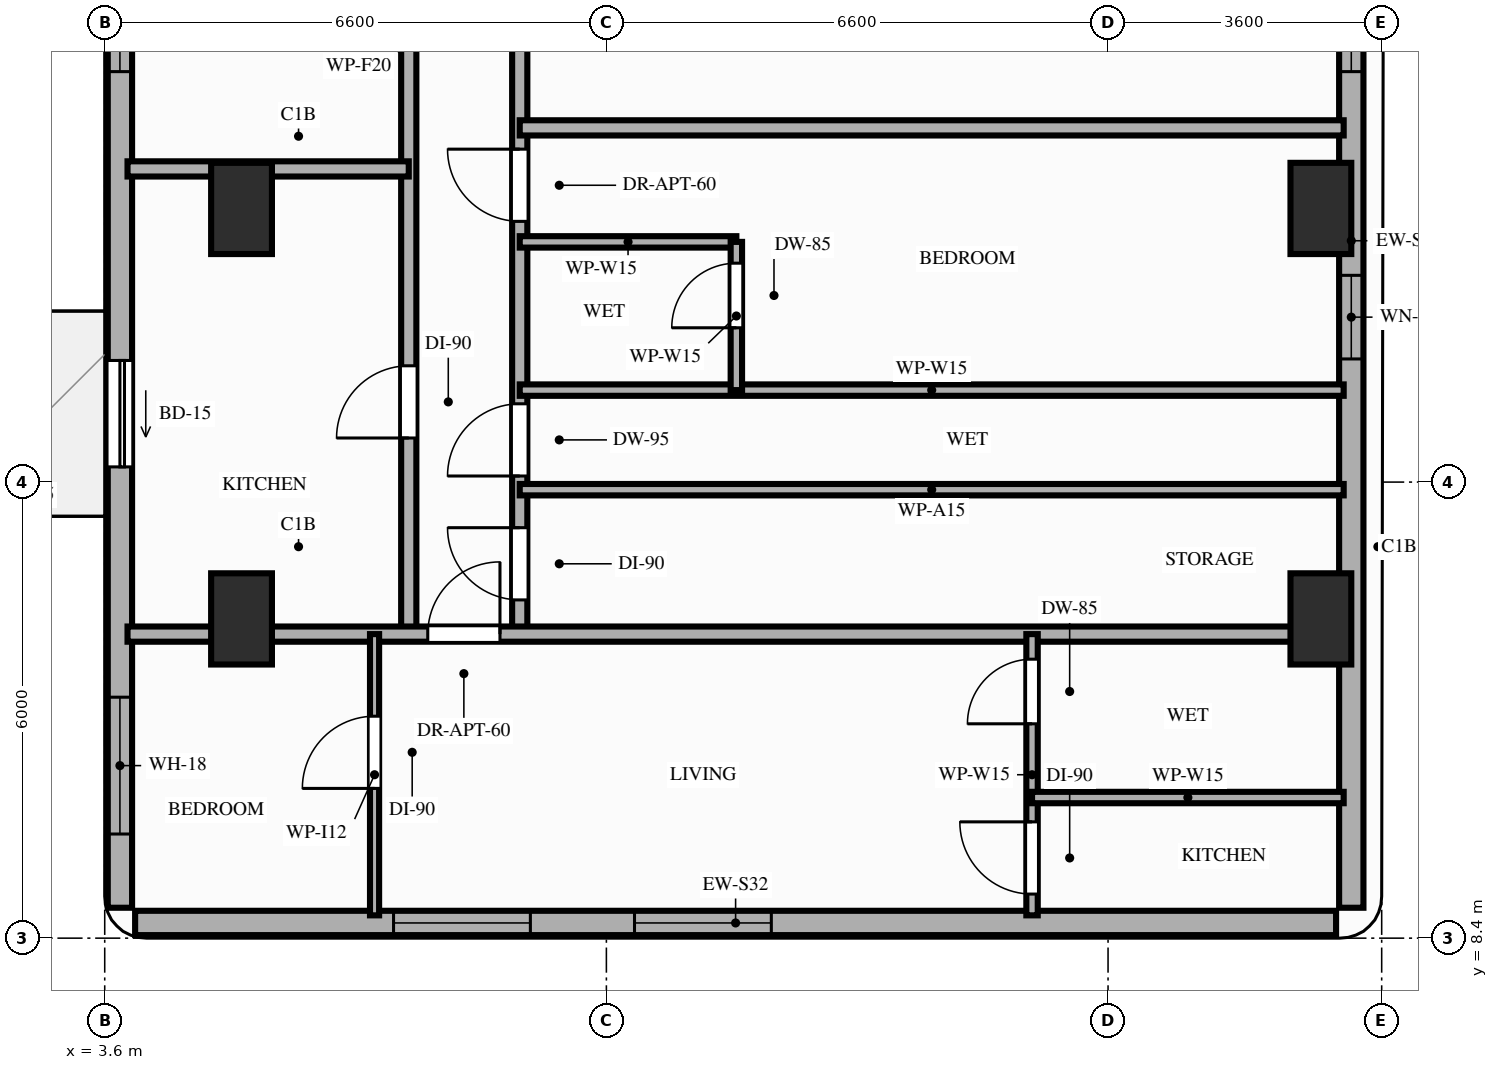
"""IFC4 building model, lengths in metres.
Left out: names, types, materials, properties, quantities, classifications, styles, units other than length and angle.
Written with IfcOpenShell. Run it as: python <this file> out.ifc"""

import sys

from ifc_helpers import new_model, si_unit, direction, frame, frame_2d, origin, origin_2d, place, context, subcontext, project, spatial, rectangle, extrude, element, fill, save


model = new_model("IFC4")
c1 = context("Model", 3, precision=1e-05, world=origin(), true_north=direction((0.0, 1.0)))
c2 = subcontext(c1, "Body", "Model", "MODEL_VIEW")
j1 = project(units=[si_unit("LENGTHUNIT", "METRE"), si_unit("PLANEANGLEUNIT", "RADIAN")], contexts=[c1])
p1 = place(None, origin())
s1 = spatial("IfcSite", under=j1, at=p1, CompositionType="ELEMENT")
p2 = place(p1, origin())
s2 = spatial("IfcBuilding", under=s1, at=p2, CompositionType="ELEMENT")
p3 = place(p2, frame((0.0, 0.0, 99.4)))
s3 = spatial("IfcBuildingStorey", under=s2, at=p3, CompositionType="ELEMENT", Elevation=99.4)
for number, where, z_axis, x_axis in (
    (1, (5.4, 12.6, 0.0), (0.0, 0.0, 1.0), (1.0, 0.0, 0.0)),
    (2, (19.6, 12.6, 0.0), (0.0, 0.0, 1.0), (1.0, 0.0, 0.0)),
    (3, (5.4, 18.0, 0.0), (0.0, 0.0, 1.0), (1.0, 0.0, 0.0)),
    (4, (19.6, 18.0, 0.0), (0.0, 0.0, 1.0), (1.0, 0.0, 0.0)),
):
    element("IfcColumn", number, at=place(p3, frame(where, z_axis=z_axis, x_axis=x_axis)), inside=s3, PredefinedType="COLUMN", context=c2, shape_type="SweptSolid", body=[
        extrude(rectangle(XDim=0.8, YDim=1.2, at=origin_2d()), origin(), (0.0, 0.0, 1.0), 3.2),
    ])
p4 = place(p3, frame((4.0, 8.6, 0.0), z_axis=(0.0, 0.0, 1.0), x_axis=(1.0, 0.0, 0.0)))
e5 = element("IfcWall", 5, at=p4, inside=s3, PredefinedType="STANDARD", context=c2, shape_type="SweptSolid", body=[
    extrude(rectangle(XDim=15.8, YDim=0.32, at=frame_2d((7.9, 0.0))), origin(), (0.0, 0.0, 1.0), 2.96),
])
p5 = place(p4, frame((6.57, 0.0, 0.85)))
e6 = element("IfcOpeningElement", 6, at=p5, cuts=e5, PredefinedType="OPENING", context=c2, shape_type="SweptSolid", body=[
    extrude(rectangle(XDim=1.8, YDim=1.75, at=frame_2d((0.9, 0.875))), frame((0.0, 0.17, 0.0), z_axis=(0.0, -1.0, 0.0), x_axis=(1.0, 0.0, 0.0)), (0.0, 0.0, 1.0), 0.34),
])
p6 = place(p4, frame((3.4, 0.0, 0.85)))
e7 = element("IfcOpeningElement", 7, at=p6, cuts=e5, PredefinedType="OPENING", context=c2, shape_type="SweptSolid", body=[
    extrude(rectangle(XDim=1.8, YDim=1.75, at=frame_2d((0.9, 0.875))), frame((0.0, 0.17, 0.0), z_axis=(0.0, -1.0, 0.0), x_axis=(1.0, 0.0, 0.0)), (0.0, 0.0, 1.0), 0.34),
])
p7 = place(p3, frame((3.8, 42.1, 0.0), z_axis=(0.0, 0.0, 1.0), x_axis=(0.0, -1.0, 0.0)))
e8 = element("IfcWall", 8, at=p7, inside=s3, PredefinedType="STANDARD", context=c2, shape_type="SweptSolid", body=[
    extrude(rectangle(XDim=33.3, YDim=0.32, at=frame_2d((16.65, 0.0))), origin(), (0.0, 0.0, 1.0), 2.96),
])
p8 = place(p7, frame((26.1, 0.0, 0.0)))
e9 = element("IfcOpeningElement", 9, at=p8, cuts=e8, PredefinedType="OPENING", context=c2, shape_type="SweptSolid", body=[
    extrude(rectangle(XDim=1.4, YDim=2.1, at=frame_2d((0.7, 1.05))), frame((0.0, 0.17, 0.0), z_axis=(0.0, -1.0, 0.0), x_axis=(1.0, 0.0, 0.0)), (0.0, 0.0, 1.0), 0.34),
])
p9 = place(p7, frame((15.3, 0.0, 0.0)))
e10 = element("IfcOpeningElement", 10, at=p9, cuts=e8, PredefinedType="OPENING", context=c2, shape_type="SweptSolid", body=[
    extrude(rectangle(XDim=1.4, YDim=2.1, at=frame_2d((0.7, 1.05))), frame((0.0, 0.17, 0.0), z_axis=(0.0, -1.0, 0.0), x_axis=(1.0, 0.0, 0.0)), (0.0, 0.0, 1.0), 0.34),
])
p10 = place(p7, frame((30.53, 0.0, 0.85)))
e11 = element("IfcOpeningElement", 11, at=p10, cuts=e8, PredefinedType="OPENING", context=c2, shape_type="SweptSolid", body=[
    extrude(rectangle(XDim=1.8, YDim=1.75, at=frame_2d((0.9, 0.875))), frame((0.0, 0.17, 0.0), z_axis=(0.0, -1.0, 0.0), x_axis=(1.0, 0.0, 0.0)), (0.0, 0.0, 1.0), 0.34),
])
p11 = place(p7, frame((20.5, 0.0, 0.85)))
e12 = element("IfcOpeningElement", 12, at=p11, cuts=e8, PredefinedType="OPENING", context=c2, shape_type="SweptSolid", body=[
    extrude(rectangle(XDim=1.8, YDim=1.75, at=frame_2d((0.9, 0.875))), frame((0.0, 0.17, 0.0), z_axis=(0.0, -1.0, 0.0), x_axis=(1.0, 0.0, 0.0)), (0.0, 0.0, 1.0), 0.34),
])
p12 = place(p7, frame((9.9, 0.0, 0.85)))
e13 = element("IfcOpeningElement", 13, at=p12, cuts=e8, PredefinedType="OPENING", context=c2, shape_type="SweptSolid", body=[
    extrude(rectangle(XDim=1.8, YDim=1.75, at=frame_2d((0.9, 0.875))), frame((0.0, 0.17, 0.0), z_axis=(0.0, -1.0, 0.0), x_axis=(1.0, 0.0, 0.0)), (0.0, 0.0, 1.0), 0.34),
])
p13 = place(p7, frame((3.8, 0.0, 0.85)))
e14 = element("IfcOpeningElement", 14, at=p13, cuts=e8, PredefinedType="OPENING", context=c2, shape_type="SweptSolid", body=[
    extrude(rectangle(XDim=1.8, YDim=1.75, at=frame_2d((0.9, 0.875))), frame((0.0, 0.17, 0.0), z_axis=(0.0, -1.0, 0.0), x_axis=(1.0, 0.0, 0.0)), (0.0, 0.0, 1.0), 0.34),
])
p14 = place(p3, frame((20.0, 8.8, 0.0), z_axis=(0.0, 0.0, 1.0), x_axis=(0.0, 1.0, 0.0)))
e15 = element("IfcWall", 15, at=p14, inside=s3, PredefinedType="STANDARD", context=c2, shape_type="SweptSolid", body=[
    extrude(rectangle(XDim=17.55, YDim=0.32, at=frame_2d((8.775, 0.0))), origin(), (0.0, 0.0, 1.0), 2.35),
])
p15 = place(p14, frame((7.22, 0.0, 0.85)))
e16 = element("IfcOpeningElement", 16, at=p15, cuts=e15, PredefinedType="OPENING", context=c2, shape_type="SweptSolid", body=[
    extrude(rectangle(XDim=1.1, YDim=1.25, at=frame_2d((0.55, 0.625))), frame((0.0, 0.17, 0.0), z_axis=(0.0, -1.0, 0.0), x_axis=(1.0, 0.0, 0.0)), (0.0, 0.0, 1.0), 0.34),
])
p16 = place(p14, frame((11.0, 0.0, 0.85)))
e17 = element("IfcOpeningElement", 17, at=p16, cuts=e15, PredefinedType="OPENING", context=c2, shape_type="SweptSolid", body=[
    extrude(rectangle(XDim=1.8, YDim=1.25, at=frame_2d((0.9, 0.625))), frame((0.0, 0.17, 0.0), z_axis=(0.0, -1.0, 0.0), x_axis=(1.0, 0.0, 0.0)), (0.0, 0.0, 1.0), 0.34),
])
p17 = place(p3, frame((7.6, 12.4, 0.0), z_axis=(0.0, 0.0, 1.0), x_axis=(0.0, 1.0, 0.0)))
e18 = element("IfcWall", 18, at=p17, inside=s3, PredefinedType="PARTITIONING", context=c2, shape_type="SweptSolid", body=[
    extrude(rectangle(XDim=15.7, YDim=0.2, at=frame_2d((7.85, 0.0))), origin(), (0.0, 0.0, 1.0), 2.35),
])
p18 = place(p17, frame((2.58, 0.0, 0.0)))
e19 = element("IfcOpeningElement", 19, at=p18, cuts=e18, PredefinedType="OPENING", context=c2, shape_type="SweptSolid", body=[
    extrude(rectangle(XDim=0.95, YDim=2.15, at=frame_2d((0.475, 1.075))), frame((0.0, 0.11, 0.0), z_axis=(0.0, -1.0, 0.0), x_axis=(1.0, 0.0, 0.0)), (0.0, 0.0, 1.0), 0.22),
])
p19 = place(p17, frame((7.84, 0.0, 0.0)))
e20 = element("IfcOpeningElement", 20, at=p19, cuts=e18, PredefinedType="OPENING", context=c2, shape_type="SweptSolid", body=[
    extrude(rectangle(XDim=0.95, YDim=2.15, at=frame_2d((0.475, 1.075))), frame((0.0, 0.11, 0.0), z_axis=(0.0, -1.0, 0.0), x_axis=(1.0, 0.0, 0.0)), (0.0, 0.0, 1.0), 0.22),
])
p20 = place(p17, frame((12.63, 0.0, 0.0)))
e21 = element("IfcOpeningElement", 21, at=p20, cuts=e18, PredefinedType="OPENING", context=c2, shape_type="SweptSolid", body=[
    extrude(rectangle(XDim=0.95, YDim=2.15, at=frame_2d((0.475, 1.075))), frame((0.0, 0.11, 0.0), z_axis=(0.0, -1.0, 0.0), x_axis=(1.0, 0.0, 0.0)), (0.0, 0.0, 1.0), 0.22),
])
p21 = place(p3, frame((9.06, 12.4, 0.0), z_axis=(0.0, 0.0, 1.0), x_axis=(0.0, 1.0, 0.0)))
e22 = element("IfcWall", 22, at=p21, inside=s3, PredefinedType="PARTITIONING", context=c2, shape_type="SweptSolid", body=[
    extrude(rectangle(XDim=15.7, YDim=0.2, at=frame_2d((7.85, 0.0))), origin(), (0.0, 0.0, 1.0), 2.35),
])
p22 = place(p21, frame((0.45, 0.0, 0.0)))
e23 = element("IfcOpeningElement", 23, at=p22, cuts=e22, PredefinedType="OPENING", context=c2, shape_type="SweptSolid", body=[
    extrude(rectangle(XDim=0.95, YDim=2.15, at=frame_2d((0.475, 1.075))), frame((0.0, 0.11, 0.0), z_axis=(0.0, -1.0, 0.0), x_axis=(1.0, 0.0, 0.0)), (0.0, 0.0, 1.0), 0.22),
])
p23 = place(p21, frame((2.08, 0.0, 0.0)))
e24 = element("IfcOpeningElement", 24, at=p23, cuts=e22, PredefinedType="OPENING", context=c2, shape_type="SweptSolid", body=[
    extrude(rectangle(XDim=0.95, YDim=2.1, at=frame_2d((0.475, 1.05))), frame((0.0, 0.11, 0.0), z_axis=(0.0, -1.0, 0.0), x_axis=(1.0, 0.0, 0.0)), (0.0, 0.0, 1.0), 0.22),
])
p24 = place(p21, frame((10.7, 0.0, 0.0)))
e25 = element("IfcOpeningElement", 25, at=p24, cuts=e22, PredefinedType="OPENING", context=c2, shape_type="SweptSolid", body=[
    extrude(rectangle(XDim=0.95, YDim=2.15, at=frame_2d((0.475, 1.075))), frame((0.0, 0.11, 0.0), z_axis=(0.0, -1.0, 0.0), x_axis=(1.0, 0.0, 0.0)), (0.0, 0.0, 1.0), 0.22),
])
p25 = place(p21, frame((5.43, 0.0, 0.0)))
e26 = element("IfcOpeningElement", 26, at=p25, cuts=e22, PredefinedType="OPENING", context=c2, shape_type="SweptSolid", body=[
    extrude(rectangle(XDim=0.95, YDim=2.15, at=frame_2d((0.475, 1.075))), frame((0.0, 0.11, 0.0), z_axis=(0.0, -1.0, 0.0), x_axis=(1.0, 0.0, 0.0)), (0.0, 0.0, 1.0), 0.22),
])
p26 = place(p3, frame((3.9, 12.4, 0.0), z_axis=(0.0, 0.0, 1.0), x_axis=(1.0, 0.0, 0.0)))
e27 = element("IfcWall", 27, at=p26, inside=s3, PredefinedType="PARTITIONING", context=c2, shape_type="SweptSolid", body=[
    extrude(rectangle(XDim=16.0, YDim=0.2, at=frame_2d((8.0, 0.0))), origin(), (0.0, 0.0, 1.0), 2.35),
])
p27 = place(p26, frame((3.95, 0.0, 0.0)))
e28 = element("IfcOpeningElement", 28, at=p27, cuts=e27, PredefinedType="OPENING", context=c2, shape_type="SweptSolid", body=[
    extrude(rectangle(XDim=0.95, YDim=2.15, at=frame_2d((0.475, 1.075))), frame((0.0, 0.11, 0.0), z_axis=(0.0, -1.0, 0.0), x_axis=(1.0, 0.0, 0.0)), (0.0, 0.0, 1.0), 0.22),
])
p28 = place(p3, frame((3.9, 18.52, 0.0), z_axis=(0.0, 0.0, 1.0), x_axis=(1.0, 0.0, 0.0)))
e29 = element("IfcWall", 29, at=p28, inside=s3, PredefinedType="PARTITIONING", context=c2, shape_type="SweptSolid", body=[
    extrude(rectangle(XDim=3.7, YDim=0.2, at=frame_2d((1.85, 0.0))), origin(), (0.0, 0.0, 1.0), 2.35),
])
p29 = place(p3, frame((7.15, 8.7, 0.0), z_axis=(0.0, 0.0, 1.0), x_axis=(0.0, 1.0, 0.0)))
e30 = element("IfcWall", 30, at=p29, inside=s3, PredefinedType="PARTITIONING", context=c2, shape_type="SweptSolid", body=[
    extrude(rectangle(XDim=3.7, YDim=0.12, at=frame_2d((1.85, 0.0))), origin(), (0.0, 0.0, 1.0), 2.35),
])
p30 = place(p29, frame((1.67, 0.0, 0.0)))
e31 = element("IfcOpeningElement", 31, at=p30, cuts=e30, PredefinedType="OPENING", context=c2, shape_type="SweptSolid", body=[
    extrude(rectangle(XDim=0.95, YDim=2.15, at=frame_2d((0.475, 1.075))), frame((0.0, 0.07, 0.0), z_axis=(0.0, -1.0, 0.0), x_axis=(1.0, 0.0, 0.0)), (0.0, 0.0, 1.0), 0.14),
])
p31 = place(p3, frame((15.8, 8.7, 0.0), z_axis=(0.0, 0.0, 1.0), x_axis=(0.0, 1.0, 0.0)))
e32 = element("IfcWall", 32, at=p31, inside=s3, PredefinedType="PARTITIONING", context=c2, shape_type="SweptSolid", body=[
    extrude(rectangle(XDim=3.7, YDim=0.15, at=frame_2d((1.85, 0.0))), origin(), (0.0, 0.0, 1.0), 2.35),
])
p32 = place(p31, frame((0.28, 0.0, 0.0)))
e33 = element("IfcOpeningElement", 33, at=p32, cuts=e32, PredefinedType="OPENING", context=c2, shape_type="SweptSolid", body=[
    extrude(rectangle(XDim=0.95, YDim=2.15, at=frame_2d((0.475, 1.075))), frame((0.0, 0.085, 0.0), z_axis=(0.0, -1.0, 0.0), x_axis=(1.0, 0.0, 0.0)), (0.0, 0.0, 1.0), 0.17),
])
p33 = place(p31, frame((2.52, 0.0, 0.0)))
e34 = element("IfcOpeningElement", 34, at=p33, cuts=e32, PredefinedType="OPENING", context=c2, shape_type="SweptSolid", body=[
    extrude(rectangle(XDim=0.85, YDim=2.1, at=frame_2d((0.425, 1.05))), frame((0.0, 0.085, 0.0), z_axis=(0.0, -1.0, 0.0), x_axis=(1.0, 0.0, 0.0)), (0.0, 0.0, 1.0), 0.17),
])
p34 = place(p3, frame((15.8, 10.25, 0.0), z_axis=(0.0, 0.0, 1.0), x_axis=(1.0, 0.0, 0.0)))
e35 = element("IfcWall", 35, at=p34, inside=s3, PredefinedType="PARTITIONING", context=c2, shape_type="SweptSolid", body=[
    extrude(rectangle(XDim=4.1, YDim=0.15, at=frame_2d((2.05, 0.0))), origin(), (0.0, 0.0, 1.0), 2.96),
])
for number, where, z_axis, x_axis in (
    (36, (9.06, 14.3, 0.0), (0.0, 0.0, 1.0), (1.0, 0.0, 0.0)),
    (37, (9.06, 15.61, 0.0), (0.0, 0.0, 1.0), (1.0, 0.0, 0.0)),
):
    element("IfcWall", number, at=place(p3, frame(where, z_axis=z_axis, x_axis=x_axis)), inside=s3, PredefinedType="PARTITIONING", context=c2, shape_type="SweptSolid", body=[
        extrude(rectangle(XDim=10.84, YDim=0.15, at=frame_2d((5.42, 0.0))), origin(), (0.0, 0.0, 1.0), 2.35),
    ])
p35 = place(p3, frame((9.06, 19.06, 0.0), z_axis=(0.0, 0.0, 1.0), x_axis=(1.0, 0.0, 0.0)))
e38 = element("IfcWall", 38, at=p35, inside=s3, PredefinedType="PARTITIONING", context=c2, shape_type="SweptSolid", body=[
    extrude(rectangle(XDim=10.84, YDim=0.2, at=frame_2d((5.42, 0.0))), origin(), (0.0, 0.0, 1.0), 2.35),
])
p36 = place(p3, frame((9.06, 17.56, 0.0), z_axis=(0.0, 0.0, 1.0), x_axis=(1.0, 0.0, 0.0)))
e39 = element("IfcWall", 39, at=p36, inside=s3, PredefinedType="PARTITIONING", context=c2, shape_type="SweptSolid", body=[
    extrude(rectangle(XDim=2.85, YDim=0.15, at=frame_2d((1.425, 0.0))), origin(), (0.0, 0.0, 1.0), 2.96),
])
p37 = place(p3, frame((11.91, 15.61, 0.0), z_axis=(0.0, 0.0, 1.0), x_axis=(0.0, 1.0, 0.0)))
e40 = element("IfcWall", 40, at=p37, inside=s3, PredefinedType="PARTITIONING", context=c2, shape_type="SweptSolid", body=[
    extrude(rectangle(XDim=1.95, YDim=0.15, at=frame_2d((0.975, 0.0))), origin(), (0.0, 0.0, 1.0), 2.54),
])
p38 = place(p37, frame((0.82, 0.0, 0.0)))
e41 = element("IfcOpeningElement", 41, at=p38, cuts=e40, PredefinedType="OPENING", context=c2, shape_type="SweptSolid", body=[
    extrude(rectangle(XDim=0.85, YDim=2.1, at=frame_2d((0.425, 1.05))), frame((0.0, 0.085, 0.0), z_axis=(0.0, -1.0, 0.0), x_axis=(1.0, 0.0, 0.0)), (0.0, 0.0, 1.0), 0.17),
])
p39 = place(p8, origin())
e42 = element("IfcDoor", 42, at=p39, inside=s3, OperationType="SLIDING_TO_RIGHT", PredefinedType="DOOR", context=c2, shape_type="SweptSolid", body=[
    extrude(rectangle(XDim=1.4, YDim=2.1, at=frame_2d((0.7, 1.05))), frame((0.0, 0.025, 0.0), z_axis=(0.0, -1.0, 0.0), x_axis=(1.0, 0.0, 0.0)), (0.0, 0.0, 1.0), 0.05),
])
fill(e9, e42)
p40 = place(p10, origin())
e43 = element("IfcWindow", 43, at=p40, inside=s3, PartitioningType="SINGLE_PANEL", PredefinedType="WINDOW", context=c2, shape_type="SweptSolid", body=[
    extrude(rectangle(XDim=1.8, YDim=1.75, at=frame_2d((0.9, 0.875))), frame((0.0, 0.03, 0.0), z_axis=(0.0, -1.0, 0.0), x_axis=(1.0, 0.0, 0.0)), (0.0, 0.0, 1.0), 0.06),
])
fill(e11, e43)
p41 = place(p5, origin())
e44 = element("IfcWindow", 44, at=p41, inside=s3, PartitioningType="SINGLE_PANEL", PredefinedType="WINDOW", context=c2, shape_type="SweptSolid", body=[
    extrude(rectangle(XDim=1.8, YDim=1.75, at=frame_2d((0.9, 0.875))), frame((0.0, 0.03, 0.0), z_axis=(0.0, -1.0, 0.0), x_axis=(1.0, 0.0, 0.0)), (0.0, 0.0, 1.0), 0.06),
])
fill(e6, e44)
p42 = place(p15, origin())
e45 = element("IfcWindow", 45, at=p42, inside=s3, PartitioningType="SINGLE_PANEL", PredefinedType="WINDOW", context=c2, shape_type="SweptSolid", body=[
    extrude(rectangle(XDim=1.1, YDim=1.25, at=frame_2d((0.55, 0.625))), frame((0.0, 0.03, 0.0), z_axis=(0.0, -1.0, 0.0), x_axis=(1.0, 0.0, 0.0)), (0.0, 0.0, 1.0), 0.06),
])
fill(e16, e45)
p43 = place(p11, origin())
e46 = element("IfcWindow", 46, at=p43, inside=s3, PartitioningType="SINGLE_PANEL", PredefinedType="WINDOW", context=c2, shape_type="SweptSolid", body=[
    extrude(rectangle(XDim=1.8, YDim=1.75, at=frame_2d((0.9, 0.875))), frame((0.0, 0.03, 0.0), z_axis=(0.0, -1.0, 0.0), x_axis=(1.0, 0.0, 0.0)), (0.0, 0.0, 1.0), 0.06),
])
fill(e12, e46)
p44 = place(p16, origin())
e47 = element("IfcWindow", 47, at=p44, inside=s3, PartitioningType="SINGLE_PANEL", PredefinedType="WINDOW", context=c2, shape_type="SweptSolid", body=[
    extrude(rectangle(XDim=1.8, YDim=1.25, at=frame_2d((0.9, 0.625))), frame((0.0, 0.03, 0.0), z_axis=(0.0, -1.0, 0.0), x_axis=(1.0, 0.0, 0.0)), (0.0, 0.0, 1.0), 0.06),
])
fill(e17, e47)
p45 = place(p6, origin())
e48 = element("IfcWindow", 48, at=p45, inside=s3, PartitioningType="SINGLE_PANEL", PredefinedType="WINDOW", context=c2, shape_type="SweptSolid", body=[
    extrude(rectangle(XDim=1.8, YDim=1.75, at=frame_2d((0.9, 0.875))), frame((0.0, 0.03, 0.0), z_axis=(0.0, -1.0, 0.0), x_axis=(1.0, 0.0, 0.0)), (0.0, 0.0, 1.0), 0.06),
])
fill(e7, e48)
p46 = place(p18, origin())
e49 = element("IfcDoor", 49, at=p46, inside=s3, OperationType="SINGLE_SWING_LEFT", PredefinedType="DOOR", context=c2, shape_type="SweptSolid", body=[
    extrude(rectangle(XDim=0.95, YDim=2.15, at=frame_2d((0.475, 1.075))), frame((0.0, 0.025, 0.0), z_axis=(0.0, -1.0, 0.0), x_axis=(1.0, 0.0, 0.0)), (0.0, 0.0, 1.0), 0.05),
])
fill(e19, e49)
p47 = place(p27, origin())
e50 = element("IfcDoor", 50, at=p47, inside=s3, OperationType="SINGLE_SWING_RIGHT", PredefinedType="DOOR", context=c2, shape_type="SweptSolid", body=[
    extrude(rectangle(XDim=0.95, YDim=2.15, at=frame_2d((0.475, 1.075))), frame((0.0, 0.025, 0.0), z_axis=(0.0, -1.0, 0.0), x_axis=(1.0, 0.0, 0.0)), (0.0, 0.0, 1.0), 0.05),
])
fill(e28, e50)
p48 = place(p30, origin())
e51 = element("IfcDoor", 51, at=p48, inside=s3, OperationType="SINGLE_SWING_LEFT", PredefinedType="DOOR", context=c2, shape_type="SweptSolid", body=[
    extrude(rectangle(XDim=0.95, YDim=2.15, at=frame_2d((0.475, 1.075))), frame((0.0, 0.025, 0.0), z_axis=(0.0, -1.0, 0.0), x_axis=(1.0, 0.0, 0.0)), (0.0, 0.0, 1.0), 0.05),
])
fill(e31, e51)
p49 = place(p32, origin())
e52 = element("IfcDoor", 52, at=p49, inside=s3, OperationType="SINGLE_SWING_RIGHT", PredefinedType="DOOR", context=c2, shape_type="SweptSolid", body=[
    extrude(rectangle(XDim=0.95, YDim=2.15, at=frame_2d((0.475, 1.075))), frame((0.0, 0.025, 0.0), z_axis=(0.0, -1.0, 0.0), x_axis=(1.0, 0.0, 0.0)), (0.0, 0.0, 1.0), 0.05),
])
fill(e33, e52)
p50 = place(p33, origin())
e53 = element("IfcDoor", 53, at=p50, inside=s3, OperationType="SINGLE_SWING_LEFT", PredefinedType="DOOR", context=c2, shape_type="SweptSolid", body=[
    extrude(rectangle(XDim=0.85, YDim=2.1, at=frame_2d((0.425, 1.05))), frame((0.0, 0.025, 0.0), z_axis=(0.0, -1.0, 0.0), x_axis=(1.0, 0.0, 0.0)), (0.0, 0.0, 1.0), 0.05),
])
fill(e34, e53)
p51 = place(p22, origin())
e54 = element("IfcDoor", 54, at=p51, inside=s3, OperationType="SINGLE_SWING_RIGHT", PredefinedType="DOOR", context=c2, shape_type="SweptSolid", body=[
    extrude(rectangle(XDim=0.95, YDim=2.15, at=frame_2d((0.475, 1.075))), frame((0.0, 0.025, 0.0), z_axis=(0.0, -1.0, 0.0), x_axis=(1.0, 0.0, 0.0)), (0.0, 0.0, 1.0), 0.05),
])
fill(e23, e54)
p52 = place(p23, origin())
e55 = element("IfcDoor", 55, at=p52, inside=s3, OperationType="SINGLE_SWING_LEFT", PredefinedType="DOOR", context=c2, shape_type="SweptSolid", body=[
    extrude(rectangle(XDim=0.95, YDim=2.1, at=frame_2d((0.475, 1.05))), frame((0.0, 0.025, 0.0), z_axis=(0.0, -1.0, 0.0), x_axis=(1.0, 0.0, 0.0)), (0.0, 0.0, 1.0), 0.05),
])
fill(e24, e55)
p53 = place(p38, origin())
e56 = element("IfcDoor", 56, at=p53, inside=s3, OperationType="SINGLE_SWING_LEFT", PredefinedType="DOOR", context=c2, shape_type="SweptSolid", body=[
    extrude(rectangle(XDim=0.85, YDim=2.1, at=frame_2d((0.425, 1.05))), frame((0.0, 0.025, 0.0), z_axis=(0.0, -1.0, 0.0), x_axis=(1.0, 0.0, 0.0)), (0.0, 0.0, 1.0), 0.05),
])
fill(e41, e56)
p54 = place(p25, origin())
e57 = element("IfcDoor", 57, at=p54, inside=s3, OperationType="SINGLE_SWING_RIGHT", PredefinedType="DOOR", context=c2, shape_type="SweptSolid", body=[
    extrude(rectangle(XDim=0.95, YDim=2.15, at=frame_2d((0.475, 1.075))), frame((0.0, 0.025, 0.0), z_axis=(0.0, -1.0, 0.0), x_axis=(1.0, 0.0, 0.0)), (0.0, 0.0, 1.0), 0.05),
])
fill(e26, e57)
save(model, sys.argv[1])
